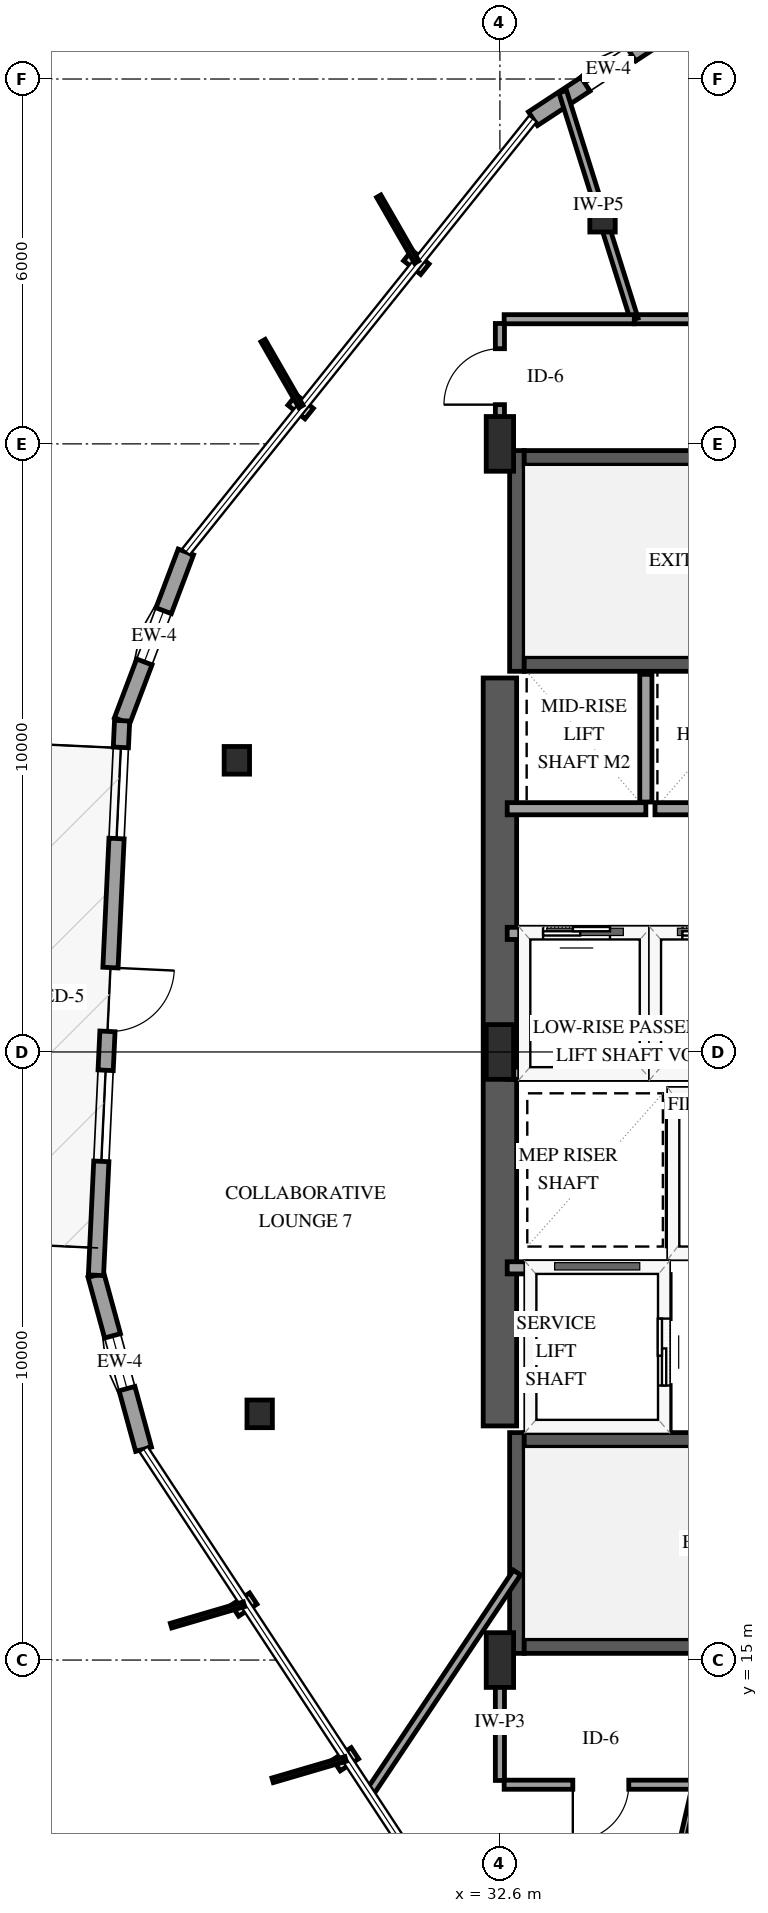
"""IFC4 building model, lengths in metres.
Left out: names, types, materials, properties, quantities, classifications, styles, units other than length and angle.
Written with IfcOpenShell. Run it as: python <this file> out.ifc"""

import sys

from ifc_helpers import new_model, si_unit, direction, frame, frame_2d, origin, origin_2d, place, context, subcontext, project, spatial, rectangle, i_section, extrude, element, fill, save


model = new_model("IFC4")
c1 = context("Model", 3, precision=1e-05, world=origin(), true_north=direction((0.0, 1.0)))
c2 = subcontext(c1, "Body", "Model", "MODEL_VIEW")
j1 = project(units=[si_unit("LENGTHUNIT", "METRE"), si_unit("PLANEANGLEUNIT", "RADIAN")], contexts=[c1])
p1 = place(None, origin())
s1 = spatial("IfcSite", under=j1, at=p1, CompositionType="ELEMENT")
p2 = place(p1, origin())
s2 = spatial("IfcBuilding", under=s1, at=p2, CompositionType="ELEMENT")
p3 = place(p2, frame((0.0, 0.0, 87.4)))
s3 = spatial("IfcBuildingStorey", under=s2, at=p3, CompositionType="ELEMENT", Elevation=87.4)
p4 = place(p3, frame((32.88, 15.11, 0.0), z_axis=(0.0, 0.0, 1.0), x_axis=(0.0, 1.0, 0.0)))
e1 = element("IfcWall", 1, at=p4, inside=s3, PredefinedType="SHEAR", context=c2, shape_type="SweptSolid", body=[
    extrude(rectangle(XDim=3.63, YDim=0.24, at=frame_2d((1.815, 0.0))), origin(), (0.0, 0.0, 1.0), 3.9),
])
for number, where, z_axis, x_axis in (
    (2, (33.0, 15.23, 0.0), (0.0, 0.0, 1.0), (1.0, 0.0, 0.0)),
    (3, (33.0, 18.62, 0.0), (0.0, 0.0, 1.0), (1.0, 0.0, 0.0)),
):
    element("IfcWall", number, at=place(p3, frame(where, z_axis=z_axis, x_axis=x_axis)), inside=s3, PredefinedType="SHEAR", context=c2, shape_type="SweptSolid", body=[
        extrude(rectangle(XDim=8.0, YDim=0.24, at=frame_2d((4.0, 0.0))), origin(), (0.0, 0.0, 1.0), 3.9),
    ])
p5 = place(p3, frame((32.88, 31.26, 0.0), z_axis=(0.0, 0.0, 1.0), x_axis=(0.0, 1.0, 0.0)))
e4 = element("IfcWall", 4, at=p5, inside=s3, PredefinedType="SHEAR", context=c2, shape_type="SweptSolid", body=[
    extrude(rectangle(XDim=3.63, YDim=0.24, at=frame_2d((1.815, 0.0))), origin(), (0.0, 0.0, 1.0), 3.9),
])
for number, where, z_axis, x_axis in (
    (5, (33.0, 31.38, 0.0), (0.0, 0.0, 1.0), (1.0, 0.0, 0.0)),
    (6, (33.0, 34.77, 0.0), (0.0, 0.0, 1.0), (1.0, 0.0, 0.0)),
):
    element("IfcWall", number, at=place(p3, frame(where, z_axis=z_axis, x_axis=x_axis)), inside=s3, PredefinedType="SHEAR", context=c2, shape_type="SweptSolid", body=[
        extrude(rectangle(XDim=8.0, YDim=0.24, at=frame_2d((4.0, 0.0))), origin(), (0.0, 0.0, 1.0), 3.9),
    ])
p6 = place(p3, frame((32.6, 18.85, 0.0), z_axis=(0.0, 0.0, 1.0), x_axis=(0.0, 1.0, 0.0)))
e7 = element("IfcWall", 7, at=p6, inside=s3, PredefinedType="SHEAR", context=c2, shape_type="SweptSolid", body=[
    extrude(rectangle(XDim=12.3, YDim=0.55, at=frame_2d((6.15, 0.0))), origin(), (0.0, 0.0, 1.0), 3.9),
])
for number, where, z_axis, x_axis in (
    (8, (32.6, 15.0, -0.3), (0.0, 0.0, 1.0), (1.0, 0.0, 0.0)),
    (9, (32.6, 25.0, -0.3), (0.0, 0.0, 1.0), (1.0, 0.0, 0.0)),
    (10, (32.6, 35.0, -0.3), (0.0, 0.0, 1.0), (1.0, 0.0, 0.0)),
):
    element("IfcColumn", number, at=place(p3, frame(where, z_axis=z_axis, x_axis=x_axis)), inside=s3, PredefinedType="PILASTER", context=c2, shape_type="SweptSolid", body=[
        extrude(rectangle(XDim=0.45, YDim=0.9, at=origin_2d()), origin(), (0.0, 0.0, 1.0), 4.2),
    ])
for number, where, z_axis, x_axis in (
    (11, (34.288, 38.711, -0.3), (0.0, 0.0, 1.0), (1.0, 0.0, 0.0)),
    (12, (28.274, 29.796, -0.3), (0.0, 0.0, 1.0), (1.0, 0.0, 0.0)),
    (13, (28.649, 19.049, -0.3), (0.0, 0.0, 1.0), (1.0, 0.0, 0.0)),
):
    element("IfcColumn", number, at=place(p3, frame(where, z_axis=z_axis, x_axis=x_axis)), inside=s3, PredefinedType="COLUMN", context=c2, shape_type="SweptSolid", body=[
        extrude(i_section(OverallWidth=0.418, OverallDepth=0.455, WebThickness=0.042, FlangeThickness=0.068, FilletRadius=0.038, at=origin_2d()), origin(), (0.0, 0.0, 1.0), 4.2),
    ])
p7 = place(p3, frame((35.623, 41.976, 0.0), z_axis=(0.0, 0.0, 1.0), x_axis=(-0.835816616247, -0.549008728533, 0.0)))
e14 = element("IfcWall", 14, at=p7, inside=s3, PredefinedType="SOLIDWALL", context=c2, shape_type="SweptSolid", body=[
    extrude(rectangle(XDim=2.967, YDim=0.27, at=frame_2d((1.483, 0.0))), origin(), (0.0, 0.0, 1.0), 2.979),
])
p8 = place(p7, frame((1.033, 0.0, 0.75)))
e15 = element("IfcOpeningElement", 15, at=p8, cuts=e14, PredefinedType="OPENING", context=c2, shape_type="SweptSolid", body=[
    extrude(rectangle(XDim=0.9, YDim=1.5, at=frame_2d((0.45, 0.75))), frame((0.0, 0.145, 0.0), z_axis=(0.0, -1.0, 0.0), x_axis=(1.0, 0.0, 0.0)), (0.0, 0.0, 1.0), 0.29),
])
p9 = place(p3, frame((27.436, 33.223, 0.0), z_axis=(0.0, 0.0, 1.0), x_axis=(-0.35345818185, -0.935450326679, 0.0)))
e16 = element("IfcWall", 16, at=p9, inside=s3, PredefinedType="SOLIDWALL", context=c2, shape_type="SweptSolid", body=[
    extrude(rectangle(XDim=2.967, YDim=0.27, at=frame_2d((1.483, 0.0))), origin(), (0.0, 0.0, 1.0), 2.979),
])
p10 = place(p9, frame((1.033, 0.0, 0.75)))
e17 = element("IfcOpeningElement", 17, at=p10, cuts=e16, PredefinedType="OPENING", context=c2, shape_type="SweptSolid", body=[
    extrude(rectangle(XDim=0.9, YDim=1.5, at=frame_2d((0.45, 0.75))), frame((0.0, 0.145, 0.0), z_axis=(0.0, -1.0, 0.0), x_axis=(1.0, 0.0, 0.0)), (0.0, 0.0, 1.0), 0.29),
])
p11 = place(p3, frame((25.957, 21.328, 0.0), z_axis=(0.0, 0.0, 1.0), x_axis=(0.263855501226, -0.964562219078, 0.0)))
e18 = element("IfcWall", 18, at=p11, inside=s3, PredefinedType="SOLIDWALL", context=c2, shape_type="SweptSolid", body=[
    extrude(rectangle(XDim=2.967, YDim=0.27, at=frame_2d((1.483, 0.0))), origin(), (0.0, 0.0, 1.0), 2.979),
])
p12 = place(p11, frame((1.033, 0.0, 0.75)))
e19 = element("IfcOpeningElement", 19, at=p12, cuts=e18, PredefinedType="OPENING", context=c2, shape_type="SweptSolid", body=[
    extrude(rectangle(XDim=0.9, YDim=1.5, at=frame_2d((0.45, 0.75))), frame((0.0, 0.145, 0.0), z_axis=(0.0, -1.0, 0.0), x_axis=(1.0, 0.0, 0.0)), (0.0, 0.0, 1.0), 0.29),
])
p13 = place(p3, frame((26.387, 30.448, 0.0), z_axis=(0.0, 0.0, 1.0), x_axis=(-0.047119184575, -0.998889274367, 0.0)))
e20 = element("IfcWall", 20, at=p13, inside=s3, PredefinedType="SOLIDWALL", context=c2, shape_type="SweptSolid", body=[
    extrude(rectangle(XDim=9.13, YDim=0.25, at=frame_2d((4.565, 0.0))), origin(), (0.0, 0.0, 1.0), 2.979),
])
p14 = place(p13, frame((4.065, 0.0, 0.0)))
e21 = element("IfcOpeningElement", 21, at=p14, cuts=e20, PredefinedType="OPENING", context=c2, shape_type="SweptSolid", body=[
    extrude(rectangle(XDim=1.05, YDim=2.15, at=frame_2d((0.525, 1.075))), frame((0.0, 0.135, 0.0), z_axis=(0.0, -1.0, 0.0), x_axis=(1.0, 0.0, 0.0)), (0.0, 0.0, 1.0), 0.27),
])
p15 = place(p13, frame((0.44, 0.0, 0.72)))
e22 = element("IfcOpeningElement", 22, at=p15, cuts=e20, PredefinedType="OPENING", context=c2, shape_type="SweptSolid", body=[
    extrude(rectangle(XDim=1.5, YDim=1.7, at=frame_2d((0.75, 0.85))), frame((0.0, 0.135, 0.0), z_axis=(0.0, -1.0, 0.0), x_axis=(1.0, 0.0, 0.0)), (0.0, 0.0, 1.0), 0.27),
])
p16 = place(p13, frame((5.755, 0.0, 0.72)))
e23 = element("IfcOpeningElement", 23, at=p16, cuts=e20, PredefinedType="OPENING", context=c2, shape_type="SweptSolid", body=[
    extrude(rectangle(XDim=1.5, YDim=1.7, at=frame_2d((0.75, 0.85))), frame((0.0, 0.135, 0.0), z_axis=(0.0, -1.0, 0.0), x_axis=(1.0, 0.0, 0.0)), (0.0, 0.0, 1.0), 0.27),
])
p17 = place(p3, frame((35.45, 21.7, 0.0), z_axis=(0.0, 0.0, 1.0), x_axis=(1.0, 0.0, 0.0)))
e24 = element("IfcWall", 24, at=p17, inside=s3, PredefinedType="SOLIDWALL", context=c2, shape_type="SweptSolid", body=[
    extrude(rectangle(XDim=2.0, YDim=0.2, at=frame_2d((1.0, 0.0))), origin(), (0.0, 0.0, 1.0), 3.6),
])
p18 = place(p17, frame((0.45, 0.0, 0.0)))
e25 = element("IfcOpeningElement", 25, at=p18, cuts=e24, PredefinedType="OPENING", context=c2, shape_type="SweptSolid", body=[
    extrude(rectangle(XDim=1.1, YDim=2.15, at=frame_2d((0.55, 1.075))), frame((0.0, 0.11, 0.0), z_axis=(0.0, -1.0, 0.0), x_axis=(1.0, 0.0, 0.0)), (0.0, 0.0, 1.0), 0.22),
])
p19 = place(p3, frame((35.45, 24.3, 0.0), z_axis=(0.0, 0.0, 1.0), x_axis=(1.0, 0.0, 0.0)))
e26 = element("IfcWall", 26, at=p19, inside=s3, PredefinedType="SOLIDWALL", context=c2, shape_type="SweptSolid", body=[
    extrude(rectangle(XDim=2.0, YDim=0.2, at=frame_2d((1.0, 0.0))), origin(), (0.0, 0.0, 1.0), 3.6),
])
p20 = place(p3, frame((35.45, 21.81, 0.0), z_axis=(0.0, 0.0, 1.0), x_axis=(0.0, 1.0, 0.0)))
e27 = element("IfcWall", 27, at=p20, inside=s3, PredefinedType="SOLIDWALL", context=c2, shape_type="SweptSolid", body=[
    extrude(rectangle(XDim=2.38, YDim=0.2, at=frame_2d((1.19, 0.0))), origin(), (0.0, 0.0, 1.0), 3.6),
])
p21 = place(p3, frame((32.72, 21.45, 0.0), z_axis=(0.0, 0.0, 1.0), x_axis=(1.0, 0.0, 0.0)))
e28 = element("IfcWall", 28, at=p21, inside=s3, PredefinedType="SOLIDWALL", context=c2, shape_type="SweptSolid", body=[
    extrude(rectangle(XDim=2.58, YDim=0.2, at=frame_2d((1.29, 0.0))), origin(), (0.0, 0.0, 1.0), 3.6),
])
p22 = place(p3, frame((35.3, 18.79, 0.0), z_axis=(0.0, 0.0, 1.0), x_axis=(0.0, 1.0, 0.0)))
e29 = element("IfcWall", 29, at=p22, inside=s3, PredefinedType="SOLIDWALL", context=c2, shape_type="SweptSolid", body=[
    extrude(rectangle(XDim=2.55, YDim=0.2, at=frame_2d((1.275, 0.0))), origin(), (0.0, 0.0, 1.0), 3.6),
])
p23 = place(p22, frame((0.725, 0.0, 0.0)))
e30 = element("IfcOpeningElement", 30, at=p23, cuts=e29, PredefinedType="OPENING", context=c2, shape_type="SweptSolid", body=[
    extrude(rectangle(XDim=1.1, YDim=2.15, at=frame_2d((0.55, 1.075))), frame((0.0, 0.11, 0.0), z_axis=(0.0, -1.0, 0.0), x_axis=(1.0, 0.0, 0.0)), (0.0, 0.0, 1.0), 0.22),
])
p24 = place(p3, frame((32.72, 24.65, 0.0), z_axis=(0.0, 0.0, 1.0), x_axis=(1.0, 0.0, 0.0)))
e31 = element("IfcWall", 31, at=p24, inside=s3, PredefinedType="SOLIDWALL", context=c2, shape_type="SweptSolid", body=[
    extrude(rectangle(XDim=2.28, YDim=0.2, at=frame_2d((1.14, 0.0))), origin(), (0.0, 0.0, 1.0), 3.6),
])
p25 = place(p3, frame((32.72, 26.95, 0.0), z_axis=(0.0, 0.0, 1.0), x_axis=(1.0, 0.0, 0.0)))
e32 = element("IfcWall", 32, at=p25, inside=s3, PredefinedType="SOLIDWALL", context=c2, shape_type="SweptSolid", body=[
    extrude(rectangle(XDim=2.28, YDim=0.2, at=frame_2d((1.14, 0.0))), origin(), (0.0, 0.0, 1.0), 2.974),
])
p26 = place(p25, frame((0.59, 0.0, 0.0)))
e33 = element("IfcOpeningElement", 33, at=p26, cuts=e32, PredefinedType="OPENING", context=c2, shape_type="SweptSolid", body=[
    extrude(rectangle(XDim=1.1, YDim=2.15, at=frame_2d((0.55, 1.075))), frame((0.0, 0.11, 0.0), z_axis=(0.0, -1.0, 0.0), x_axis=(1.0, 0.0, 0.0)), (0.0, 0.0, 1.0), 0.22),
])
p27 = place(p3, frame((35.0, 24.76, 0.0), z_axis=(0.0, 0.0, 1.0), x_axis=(0.0, 1.0, 0.0)))
e34 = element("IfcWall", 34, at=p27, inside=s3, PredefinedType="SOLIDWALL", context=c2, shape_type="SweptSolid", body=[
    extrude(rectangle(XDim=2.08, YDim=0.2, at=frame_2d((1.04, 0.0))), origin(), (0.0, 0.0, 1.0), 3.6),
])
p28 = place(p3, frame((35.15, 24.65, 0.0), z_axis=(0.0, 0.0, 1.0), x_axis=(1.0, 0.0, 0.0)))
e35 = element("IfcWall", 35, at=p28, inside=s3, PredefinedType="SOLIDWALL", context=c2, shape_type="SweptSolid", body=[
    extrude(rectangle(XDim=2.0, YDim=0.2, at=frame_2d((1.0, 0.0))), origin(), (0.0, 0.0, 1.0), 3.6),
])
p29 = place(p3, frame((35.15, 26.95, 0.0), z_axis=(0.0, 0.0, 1.0), x_axis=(1.0, 0.0, 0.0)))
e36 = element("IfcWall", 36, at=p29, inside=s3, PredefinedType="SOLIDWALL", context=c2, shape_type="SweptSolid", body=[
    extrude(rectangle(XDim=2.0, YDim=0.2, at=frame_2d((1.0, 0.0))), origin(), (0.0, 0.0, 1.0), 2.974),
])
p30 = place(p29, frame((0.45, 0.0, 0.0)))
e37 = element("IfcOpeningElement", 37, at=p30, cuts=e36, PredefinedType="OPENING", context=c2, shape_type="SweptSolid", body=[
    extrude(rectangle(XDim=1.1, YDim=2.15, at=frame_2d((0.55, 1.075))), frame((0.0, 0.11, 0.0), z_axis=(0.0, -1.0, 0.0), x_axis=(1.0, 0.0, 0.0)), (0.0, 0.0, 1.0), 0.22),
])
p31 = place(p3, frame((32.72, 29.0, 0.0), z_axis=(0.0, 0.0, 1.0), x_axis=(1.0, 0.0, 0.0)))
e38 = element("IfcWall", 38, at=p31, inside=s3, PredefinedType="SOLIDWALL", context=c2, shape_type="SweptSolid", body=[
    extrude(rectangle(XDim=2.28, YDim=0.2, at=frame_2d((1.14, 0.0))), origin(), (0.0, 0.0, 1.0), 3.6),
])
p32 = place(p3, frame((35.0, 29.11, 0.0), z_axis=(0.0, 0.0, 1.0), x_axis=(0.0, 1.0, 0.0)))
e39 = element("IfcWall", 39, at=p32, inside=s3, PredefinedType="SOLIDWALL", context=c2, shape_type="SweptSolid", body=[
    extrude(rectangle(XDim=2.1, YDim=0.2, at=frame_2d((1.05, 0.0))), origin(), (0.0, 0.0, 1.0), 3.6),
])
p33 = place(p3, frame((35.15, 29.0, 0.0), z_axis=(0.0, 0.0, 1.0), x_axis=(1.0, 0.0, 0.0)))
e40 = element("IfcWall", 40, at=p33, inside=s3, PredefinedType="SOLIDWALL", context=c2, shape_type="SweptSolid", body=[
    extrude(rectangle(XDim=2.0, YDim=0.2, at=frame_2d((1.0, 0.0))), origin(), (0.0, 0.0, 1.0), 3.6),
])
p34 = place(p3, frame((34.81, 37.05, 0.0), z_axis=(0.0, 0.0, 1.0), x_axis=(1.0, 0.0, 0.0)))
e41 = element("IfcWall", 41, at=p34, inside=s3, PredefinedType="PARTITIONING", context=c2, shape_type="SweptSolid", body=[
    extrude(rectangle(XDim=7.804, YDim=0.15, at=frame_2d((3.902, 0.0))), origin(), (0.0, 0.0, 1.0), 3.6),
])
p35 = place(p34, frame((3.427, 0.0, 0.0)))
e42 = element("IfcOpeningElement", 42, at=p35, cuts=e41, PredefinedType="OPENING", context=c2, shape_type="SweptSolid", body=[
    extrude(rectangle(XDim=0.92, YDim=2.12, at=frame_2d((0.46, 1.06))), frame((0.0, 0.085, 0.0), z_axis=(0.0, -1.0, 0.0), x_axis=(1.0, 0.0, 0.0)), (0.0, 0.0, 1.0), 0.17),
])
p36 = place(p3, frame((35.819, 12.95, 0.0), z_axis=(0.0, 0.0, 1.0), x_axis=(-0.225136871807, -0.97432714678, 0.0)))
e43 = element("IfcWall", 43, at=p36, inside=s3, PredefinedType="PARTITIONING", context=c2, shape_type="SweptSolid", body=[
    extrude(rectangle(XDim=4.371, YDim=0.1, at=frame_2d((2.186, 0.0))), origin(), (0.0, 0.0, 1.0), 2.895),
])
p37 = place(p3, frame((32.88, 16.439, 0.0), z_axis=(0.0, 0.0, 1.0), x_axis=(-0.5557844679, -0.831326425203, 0.0)))
e44 = element("IfcWall", 44, at=p37, inside=s3, PredefinedType="PARTITIONING", context=c2, shape_type="SweptSolid", body=[
    extrude(rectangle(XDim=4.363, YDim=0.14, at=frame_2d((2.181, 0.0))), origin(), (0.0, 0.0, 1.0), 3.6),
])
p38 = place(p3, frame((34.81, 37.05, 0.0), z_axis=(0.0, 0.0, 1.0), x_axis=(-0.300049924384, 0.953923499489, 0.0)))
e45 = element("IfcWall", 45, at=p38, inside=s3, PredefinedType="PARTITIONING", context=c2, shape_type="SweptSolid", body=[
    extrude(rectangle(XDim=3.923, YDim=0.13, at=frame_2d((1.961, 0.0))), origin(), (0.0, 0.0, 1.0), 2.895),
])
p39 = place(p3, frame((35.819, 12.95, 0.0), z_axis=(0.0, 0.0, 1.0), x_axis=(-1.0, 0.0, 0.0)))
e46 = element("IfcWall", 46, at=p39, inside=s3, PredefinedType="PARTITIONING", context=c2, shape_type="SweptSolid", body=[
    extrude(rectangle(XDim=3.149, YDim=0.15, at=frame_2d((1.575, 0.0))), origin(), (0.0, 0.0, 1.0), 3.6),
])
p40 = place(p39, frame((1.1, 0.0, 0.0)))
e47 = element("IfcOpeningElement", 47, at=p40, cuts=e46, PredefinedType="OPENING", context=c2, shape_type="SweptSolid", body=[
    extrude(rectangle(XDim=0.92, YDim=2.12, at=frame_2d((0.46, 1.06))), frame((0.0, 0.085, 0.0), z_axis=(0.0, -1.0, 0.0), x_axis=(1.0, 0.0, 0.0)), (0.0, 0.0, 1.0), 0.17),
])
p41 = place(p3, frame((32.67, 37.05, 0.0), z_axis=(0.0, 0.0, 1.0), x_axis=(1.0, 0.0, 0.0)))
e48 = element("IfcWall", 48, at=p41, inside=s3, PredefinedType="PARTITIONING", context=c2, shape_type="SweptSolid", body=[
    extrude(rectangle(XDim=2.14, YDim=0.15, at=frame_2d((1.07, 0.0))), origin(), (0.0, 0.0, 1.0), 3.6),
])
p42 = place(p3, frame((32.6, 13.02, 0.0), z_axis=(0.0, 0.0, 1.0), x_axis=(0.0, 1.0, 0.0)))
e49 = element("IfcWall", 49, at=p42, inside=s3, PredefinedType="PARTITIONING", context=c2, shape_type="SweptSolid", body=[
    extrude(rectangle(XDim=1.91, YDim=0.15, at=frame_2d((0.955, 0.0))), origin(), (0.0, 0.0, 1.0), 3.6),
])
p43 = place(p3, frame((32.6, 35.07, 0.0), z_axis=(0.0, 0.0, 1.0), x_axis=(0.0, 1.0, 0.0)))
e50 = element("IfcWall", 50, at=p43, inside=s3, PredefinedType="PARTITIONING", context=c2, shape_type="SweptSolid", body=[
    extrude(rectangle(XDim=1.91, YDim=0.15, at=frame_2d((0.955, 0.0))), origin(), (0.0, 0.0, 1.0), 3.6),
])
p44 = place(p43, frame((0.575, 0.0, 0.0)))
e51 = element("IfcOpeningElement", 51, at=p44, cuts=e50, PredefinedType="OPENING", context=c2, shape_type="SweptSolid", body=[
    extrude(rectangle(XDim=0.92, YDim=2.12, at=frame_2d((0.46, 1.06))), frame((0.0, 0.085, 0.0), z_axis=(0.0, -1.0, 0.0), x_axis=(1.0, 0.0, 0.0)), (0.0, 0.0, 1.0), 0.17),
])
p45 = place(p8, origin())
e52 = element("IfcWindow", 52, at=p45, inside=s3, PartitioningType="SINGLE_PANEL", PredefinedType="WINDOW", context=c2, shape_type="SweptSolid", body=[
    extrude(rectangle(XDim=0.9, YDim=1.5, at=frame_2d((0.45, 0.75))), frame((0.0, 0.03, 0.0), z_axis=(0.0, -1.0, 0.0), x_axis=(1.0, 0.0, 0.0)), (0.0, 0.0, 1.0), 0.06),
])
fill(e15, e52)
p46 = place(p10, origin())
e53 = element("IfcWindow", 53, at=p46, inside=s3, PartitioningType="SINGLE_PANEL", PredefinedType="WINDOW", context=c2, shape_type="SweptSolid", body=[
    extrude(rectangle(XDim=0.9, YDim=1.5, at=frame_2d((0.45, 0.75))), frame((0.0, 0.03, 0.0), z_axis=(0.0, -1.0, 0.0), x_axis=(1.0, 0.0, 0.0)), (0.0, 0.0, 1.0), 0.06),
])
fill(e17, e53)
p47 = place(p12, origin())
e54 = element("IfcWindow", 54, at=p47, inside=s3, PartitioningType="SINGLE_PANEL", PredefinedType="WINDOW", context=c2, shape_type="SweptSolid", body=[
    extrude(rectangle(XDim=0.9, YDim=1.5, at=frame_2d((0.45, 0.75))), frame((0.0, 0.03, 0.0), z_axis=(0.0, -1.0, 0.0), x_axis=(1.0, 0.0, 0.0)), (0.0, 0.0, 1.0), 0.06),
])
fill(e19, e54)
p48 = place(p14, origin())
e55 = element("IfcDoor", 55, at=p48, inside=s3, OperationType="SINGLE_SWING_LEFT", PredefinedType="DOOR", context=c2, shape_type="SweptSolid", body=[
    extrude(rectangle(XDim=1.05, YDim=2.15, at=frame_2d((0.525, 1.075))), frame((0.0, 0.025, 0.0), z_axis=(0.0, -1.0, 0.0), x_axis=(1.0, 0.0, 0.0)), (0.0, 0.0, 1.0), 0.05),
])
fill(e21, e55)
p49 = place(p15, origin())
e56 = element("IfcWindow", 56, at=p49, inside=s3, PartitioningType="SINGLE_PANEL", PredefinedType="WINDOW", context=c2, shape_type="SweptSolid", body=[
    extrude(rectangle(XDim=1.5, YDim=1.7, at=frame_2d((0.75, 0.85))), frame((0.0, 0.03, 0.0), z_axis=(0.0, -1.0, 0.0), x_axis=(1.0, 0.0, 0.0)), (0.0, 0.0, 1.0), 0.06),
])
fill(e22, e56)
p50 = place(p16, origin())
e57 = element("IfcWindow", 57, at=p50, inside=s3, PartitioningType="SINGLE_PANEL", PredefinedType="WINDOW", context=c2, shape_type="SweptSolid", body=[
    extrude(rectangle(XDim=1.5, YDim=1.7, at=frame_2d((0.75, 0.85))), frame((0.0, 0.03, 0.0), z_axis=(0.0, -1.0, 0.0), x_axis=(1.0, 0.0, 0.0)), (0.0, 0.0, 1.0), 0.06),
])
fill(e23, e57)
p51 = place(p23, origin())
e58 = element("IfcDoor", 58, at=p51, inside=s3, OperationType="SLIDING_TO_LEFT", PredefinedType="DOOR", context=c2, shape_type="SweptSolid", body=[
    extrude(rectangle(XDim=1.1, YDim=2.15, at=frame_2d((0.55, 1.075))), frame((0.0, 0.025, 0.0), z_axis=(0.0, -1.0, 0.0), x_axis=(1.0, 0.0, 0.0)), (0.0, 0.0, 1.0), 0.05),
])
fill(e30, e58)
p52 = place(p26, origin())
e59 = element("IfcDoor", 59, at=p52, inside=s3, OperationType="SLIDING_TO_LEFT", PredefinedType="DOOR", context=c2, shape_type="SweptSolid", body=[
    extrude(rectangle(XDim=1.1, YDim=2.15, at=frame_2d((0.55, 1.075))), frame((0.0, 0.025, 0.0), z_axis=(0.0, -1.0, 0.0), x_axis=(1.0, 0.0, 0.0)), (0.0, 0.0, 1.0), 0.05),
])
fill(e33, e59)
p53 = place(p30, origin())
e60 = element("IfcDoor", 60, at=p53, inside=s3, OperationType="SLIDING_TO_LEFT", PredefinedType="DOOR", context=c2, shape_type="SweptSolid", body=[
    extrude(rectangle(XDim=1.1, YDim=2.15, at=frame_2d((0.55, 1.075))), frame((0.0, 0.025, 0.0), z_axis=(0.0, -1.0, 0.0), x_axis=(1.0, 0.0, 0.0)), (0.0, 0.0, 1.0), 0.05),
])
fill(e37, e60)
p54 = place(p40, origin())
e61 = element("IfcDoor", 61, at=p54, inside=s3, OperationType="SINGLE_SWING_RIGHT", PredefinedType="DOOR", context=c2, shape_type="SweptSolid", body=[
    extrude(rectangle(XDim=0.92, YDim=2.12, at=frame_2d((0.46, 1.06))), frame((0.0, 0.025, 0.0), z_axis=(0.0, -1.0, 0.0), x_axis=(1.0, 0.0, 0.0)), (0.0, 0.0, 1.0), 0.05),
])
fill(e47, e61)
p55 = place(p44, origin())
e62 = element("IfcDoor", 62, at=p55, inside=s3, OperationType="SINGLE_SWING_LEFT", PredefinedType="DOOR", context=c2, shape_type="SweptSolid", body=[
    extrude(rectangle(XDim=0.92, YDim=2.12, at=frame_2d((0.46, 1.06))), frame((0.0, 0.025, 0.0), z_axis=(0.0, -1.0, 0.0), x_axis=(1.0, 0.0, 0.0)), (0.0, 0.0, 1.0), 0.05),
])
fill(e51, e62)
save(model, sys.argv[1])
